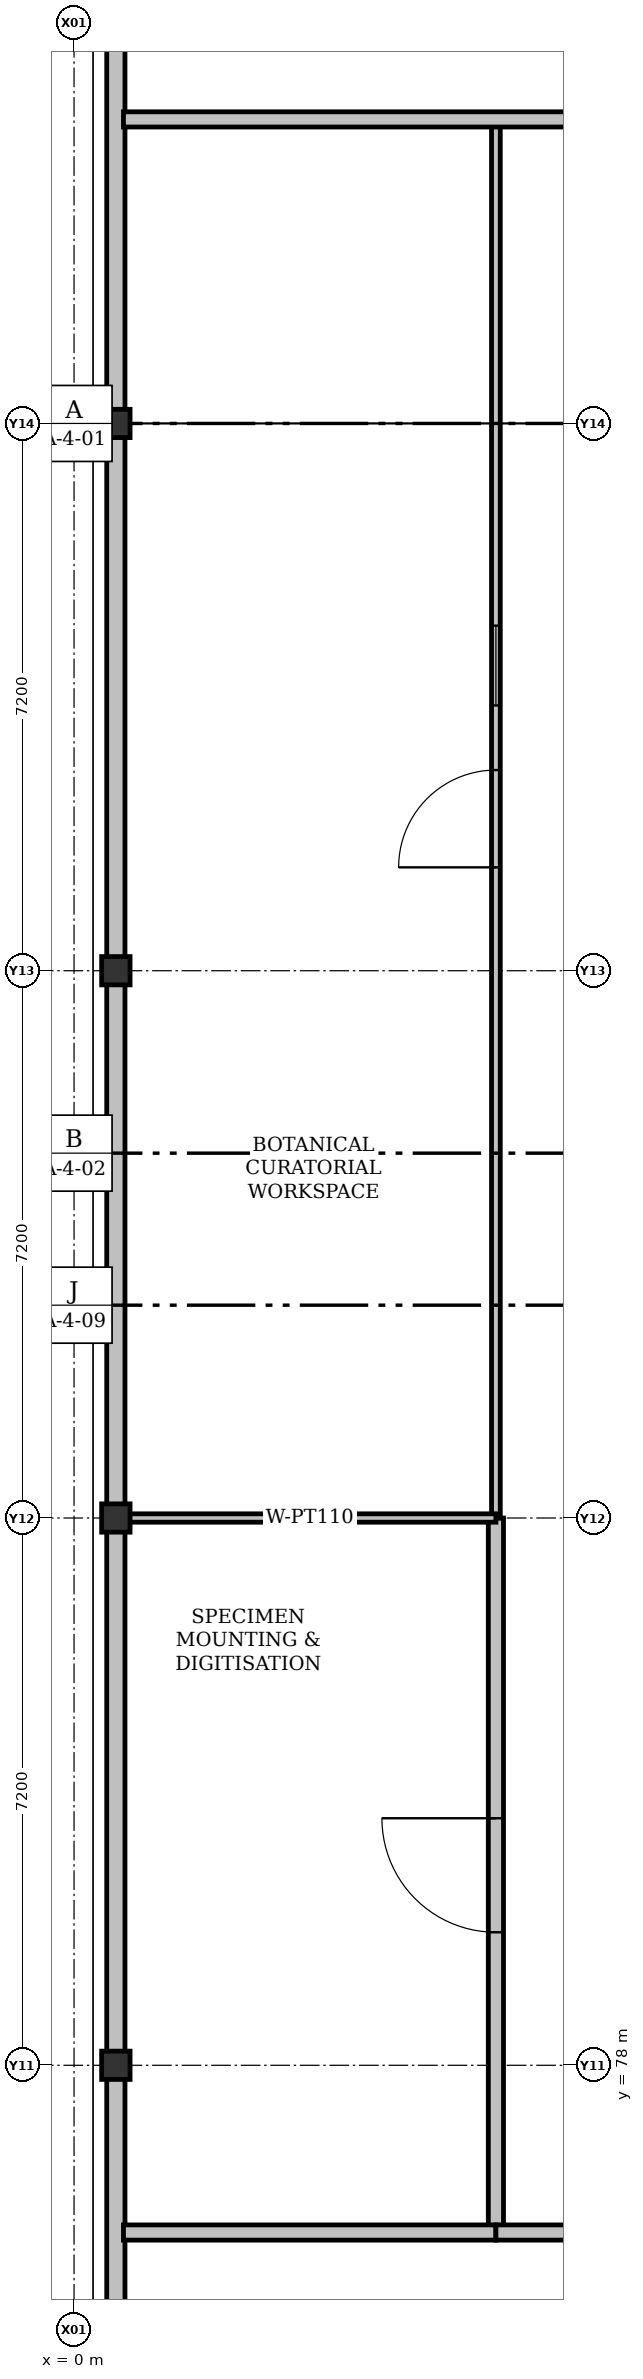
"""IFC4 building model, lengths in metres.
Left out: names, types, materials, properties, quantities, classifications, styles, units other than length and angle.
Written with IfcOpenShell. Run it as: python <this file> out.ifc"""

import sys

from ifc_helpers import new_model, si_unit, direction, frame, frame_2d, origin, origin_2d, place, context, subcontext, project, spatial, rectangle, i_section, extrude, element, fill, save


model = new_model("IFC4")
c1 = context("Model", 3, precision=1e-05, world=origin(), true_north=direction((0.0, 1.0)))
c2 = subcontext(c1, "Body", "Model", "MODEL_VIEW")
j1 = project(units=[si_unit("LENGTHUNIT", "METRE"), si_unit("PLANEANGLEUNIT", "RADIAN")], contexts=[c1])
p1 = place(None, origin())
s1 = spatial("IfcSite", under=j1, at=p1, CompositionType="ELEMENT")
p2 = place(p1, origin())
s2 = spatial("IfcBuilding", under=s1, at=p2, CompositionType="ELEMENT")
p3 = place(p2, frame((0.0, 0.0, 26.7)))
s3 = spatial("IfcBuildingStorey", under=s2, at=p3, CompositionType="ELEMENT", Elevation=26.7)
for number, where, z_axis, x_axis in (
    (1, (0.55, 78.0, 0.0), (0.0, 0.0, 1.0), (1.0, 0.0, 0.0)),
    (2, (0.55, 85.2, 0.0), (0.0, 0.0, 1.0), (1.0, 0.0, 0.0)),
    (3, (0.55, 92.4, 0.0), (0.0, 0.0, 1.0), (1.0, 0.0, 0.0)),
    (4, (0.55, 99.6, 0.0), (0.0, 0.0, 1.0), (1.0, 0.0, 0.0)),
):
    element("IfcColumn", number, at=place(p3, frame(where, z_axis=z_axis, x_axis=x_axis)), inside=s3, PredefinedType="COLUMN", context=c2, shape_type="SweptSolid", body=[
        extrude(i_section(OverallWidth=0.374, OverallDepth=0.372, WebThickness=0.016, FlangeThickness=0.026, FilletRadius=0.015, at=origin_2d()), origin(), (0.0, 0.0, 1.0), 4.2),
    ])
p4 = place(p3, frame((0.55, 70.5, 0.0), z_axis=(0.0, 0.0, 1.0), x_axis=(0.0, 1.0, 0.0)))
e5 = element("IfcWall", 5, at=p4, inside=s3, PredefinedType="SOLIDWALL", context=c2, shape_type="SweptSolid", body=[
    extrude(rectangle(XDim=7.5, YDim=0.24, at=frame_2d((3.75, 0.0))), origin(), (0.0, 0.0, 1.0), 3.557),
])
for number, where, z_axis, x_axis in (
    (6, (0.55, 78.0, 0.0), (0.0, 0.0, 1.0), (0.0, 1.0, 0.0)),
    (7, (0.55, 85.2, 0.0), (0.0, 0.0, 1.0), (0.0, 1.0, 0.0)),
):
    element("IfcWall", number, at=place(p3, frame(where, z_axis=z_axis, x_axis=x_axis)), inside=s3, PredefinedType="SOLIDWALL", context=c2, shape_type="SweptSolid", body=[
        extrude(rectangle(XDim=7.2, YDim=0.24, at=frame_2d((3.6, 0.0))), origin(), (0.0, 0.0, 1.0), 3.557),
    ])
p5 = place(p3, frame((0.55, 92.4, 0.0), z_axis=(0.0, 0.0, 1.0), x_axis=(0.0, 1.0, 0.0)))
e8 = element("IfcWall", 8, at=p5, inside=s3, PredefinedType="SOLIDWALL", context=c2, shape_type="SweptSolid", body=[
    extrude(rectangle(XDim=7.2, YDim=0.24, at=frame_2d((3.6, 0.0))), origin(), (0.0, 0.0, 1.0), 3.557),
])
p6 = place(p3, frame((0.55, 99.6, 0.0), z_axis=(0.0, 0.0, 1.0), x_axis=(0.0, 1.0, 0.0)))
e9 = element("IfcWall", 9, at=p6, inside=s3, PredefinedType="SOLIDWALL", context=c2, shape_type="SweptSolid", body=[
    extrude(rectangle(XDim=7.2, YDim=0.24, at=frame_2d((3.6, 0.0))), origin(), (0.0, 0.0, 1.0), 3.557),
])
p7 = place(p3, frame((5.55, 75.8, 0.0), z_axis=(0.0, 0.0, 1.0), x_axis=(0.0, 1.0, 0.0)))
e10 = element("IfcWall", 10, at=p7, inside=s3, PredefinedType="SOLIDWALL", context=c2, shape_type="SweptSolid", body=[
    extrude(rectangle(XDim=9.4, YDim=0.2, at=frame_2d((4.7, 0.0))), origin(), (0.0, 0.0, 1.0), 3.277),
])
p8 = place(p7, frame((3.95, 0.0, 0.0)))
e11 = element("IfcOpeningElement", 11, at=p8, cuts=e10, PredefinedType="OPENING", context=c2, shape_type="SweptSolid", body=[
    extrude(rectangle(XDim=1.5, YDim=2.3, at=frame_2d((0.75, 1.15))), frame((0.0, 0.1, 0.0), z_axis=(0.0, -1.0, 0.0), x_axis=(1.0, 0.0, 0.0)), (0.0, 0.0, 1.0), 0.2),
])
p9 = place(p3, frame((5.55, 85.2, 0.0), z_axis=(0.0, 0.0, 1.0), x_axis=(0.0, 1.0, 0.0)))
e12 = element("IfcWall", 12, at=p9, inside=s3, PredefinedType="PARTITIONING", context=c2, shape_type="SweptSolid", body=[
    extrude(rectangle(XDim=18.4, YDim=0.115, at=frame_2d((9.2, 0.0))), origin(), (0.0, 0.0, 1.0), 3.277),
])
p10 = place(p9, frame((8.56, 0.0, 0.0)))
e13 = element("IfcOpeningElement", 13, at=p10, cuts=e12, PredefinedType="OPENING", context=c2, shape_type="SweptSolid", body=[
    extrude(rectangle(XDim=1.28, YDim=2.25, at=frame_2d((0.64, 1.125))), frame((0.0, 0.058, 0.0), z_axis=(0.0, -1.0, 0.0), x_axis=(1.0, 0.0, 0.0)), (0.0, 0.0, 1.0), 0.115),
])
p11 = place(p9, frame((10.69, 0.0, 0.92)))
e14 = element("IfcOpeningElement", 14, at=p11, cuts=e12, PredefinedType="OPENING", context=c2, shape_type="SweptSolid", body=[
    extrude(rectangle(XDim=1.05, YDim=1.2, at=frame_2d((0.525, 0.6))), frame((0.0, 0.058, 0.0), z_axis=(0.0, -1.0, 0.0), x_axis=(1.0, 0.0, 0.0)), (0.0, 0.0, 1.0), 0.115),
])
p12 = place(p3, frame((0.65, 85.2, 0.0), z_axis=(0.0, 0.0, 1.0), x_axis=(1.0, 0.0, 0.0)))
e15 = element("IfcWall", 15, at=p12, inside=s3, PredefinedType="PARTITIONING", context=c2, shape_type="SweptSolid", body=[
    extrude(rectangle(XDim=4.9, YDim=0.11, at=frame_2d((2.45, 0.0))), origin(), (0.0, 0.0, 1.0), 3.277),
])
p13 = place(p3, frame((0.65, 103.6, 0.0), z_axis=(0.0, 0.0, 1.0), x_axis=(1.0, 0.0, 0.0)))
e16 = element("IfcWall", 16, at=p13, inside=s3, PredefinedType="SOLIDWALL", context=c2, shape_type="SweptSolid", body=[
    extrude(rectangle(XDim=26.89, YDim=0.2, at=frame_2d((13.445, 0.0))), origin(), (0.0, 0.0, 1.0), 3.507),
])
p14 = place(p13, frame((9.2, 0.0, 0.0)))
e17 = element("IfcOpeningElement", 17, at=p14, cuts=e16, PredefinedType="OPENING", context=c2, shape_type="SweptSolid", body=[
    extrude(rectangle(XDim=1.5, YDim=2.3, at=frame_2d((0.75, 1.15))), frame((0.0, 0.1, 0.0), z_axis=(0.0, -1.0, 0.0), x_axis=(1.0, 0.0, 0.0)), (0.0, 0.0, 1.0), 0.2),
])
p15 = place(p3, frame((0.65, 75.8, 0.0), z_axis=(0.0, 0.0, 1.0), x_axis=(1.0, 0.0, 0.0)))
e18 = element("IfcWall", 18, at=p15, inside=s3, PredefinedType="SOLIDWALL", context=c2, shape_type="SweptSolid", body=[
    extrude(rectangle(XDim=4.9, YDim=0.2, at=frame_2d((2.45, 0.0))), origin(), (0.0, 0.0, 1.0), 3.95),
])
p16 = place(p3, frame((19.75, 75.8, 0.0), z_axis=(0.0, 0.0, 1.0), x_axis=(-1.0, 0.0, 0.0)))
e19 = element("IfcWall", 19, at=p16, inside=s3, PredefinedType="SOLIDWALL", context=c2, shape_type="SweptSolid", body=[
    extrude(rectangle(XDim=14.2, YDim=0.2, at=frame_2d((7.1, 0.0))), origin(), (0.0, 0.0, 1.0), 3.507),
])
p17 = place(p16, frame((7.875, 0.0, 0.0)))
e20 = element("IfcOpeningElement", 20, at=p17, cuts=e19, PredefinedType="OPENING", context=c2, shape_type="SweptSolid", body=[
    extrude(rectangle(XDim=1.35, YDim=2.25, at=frame_2d((0.675, 1.125))), frame((0.0, 0.1, 0.0), z_axis=(0.0, -1.0, 0.0), x_axis=(1.0, 0.0, 0.0)), (0.0, 0.0, 1.0), 0.2),
])
p18 = place(p8, origin())
e21 = element("IfcDoor", 21, at=p18, inside=s3, OperationType="SINGLE_SWING_RIGHT", PredefinedType="DOOR", context=c2, shape_type="SweptSolid", body=[
    extrude(rectangle(XDim=1.5, YDim=2.3, at=frame_2d((0.75, 1.15))), frame((0.0, 0.025, 0.0), z_axis=(0.0, -1.0, 0.0), x_axis=(1.0, 0.0, 0.0)), (0.0, 0.0, 1.0), 0.05),
])
fill(e11, e21)
p19 = place(p10, origin())
e22 = element("IfcDoor", 22, at=p19, inside=s3, OperationType="SINGLE_SWING_LEFT", PredefinedType="DOOR", context=c2, shape_type="SweptSolid", body=[
    extrude(rectangle(XDim=1.28, YDim=2.25, at=frame_2d((0.64, 1.125))), frame((0.0, 0.025, 0.0), z_axis=(0.0, -1.0, 0.0), x_axis=(1.0, 0.0, 0.0)), (0.0, 0.0, 1.0), 0.05),
])
fill(e13, e22)
p20 = place(p11, origin())
e23 = element("IfcWindow", 23, at=p20, inside=s3, PartitioningType="SINGLE_PANEL", PredefinedType="WINDOW", context=c2, shape_type="SweptSolid", body=[
    extrude(rectangle(XDim=1.05, YDim=1.2, at=frame_2d((0.525, 0.6))), frame((0.0, 0.03, 0.0), z_axis=(0.0, -1.0, 0.0), x_axis=(1.0, 0.0, 0.0)), (0.0, 0.0, 1.0), 0.06),
])
fill(e14, e23)
save(model, sys.argv[1])
